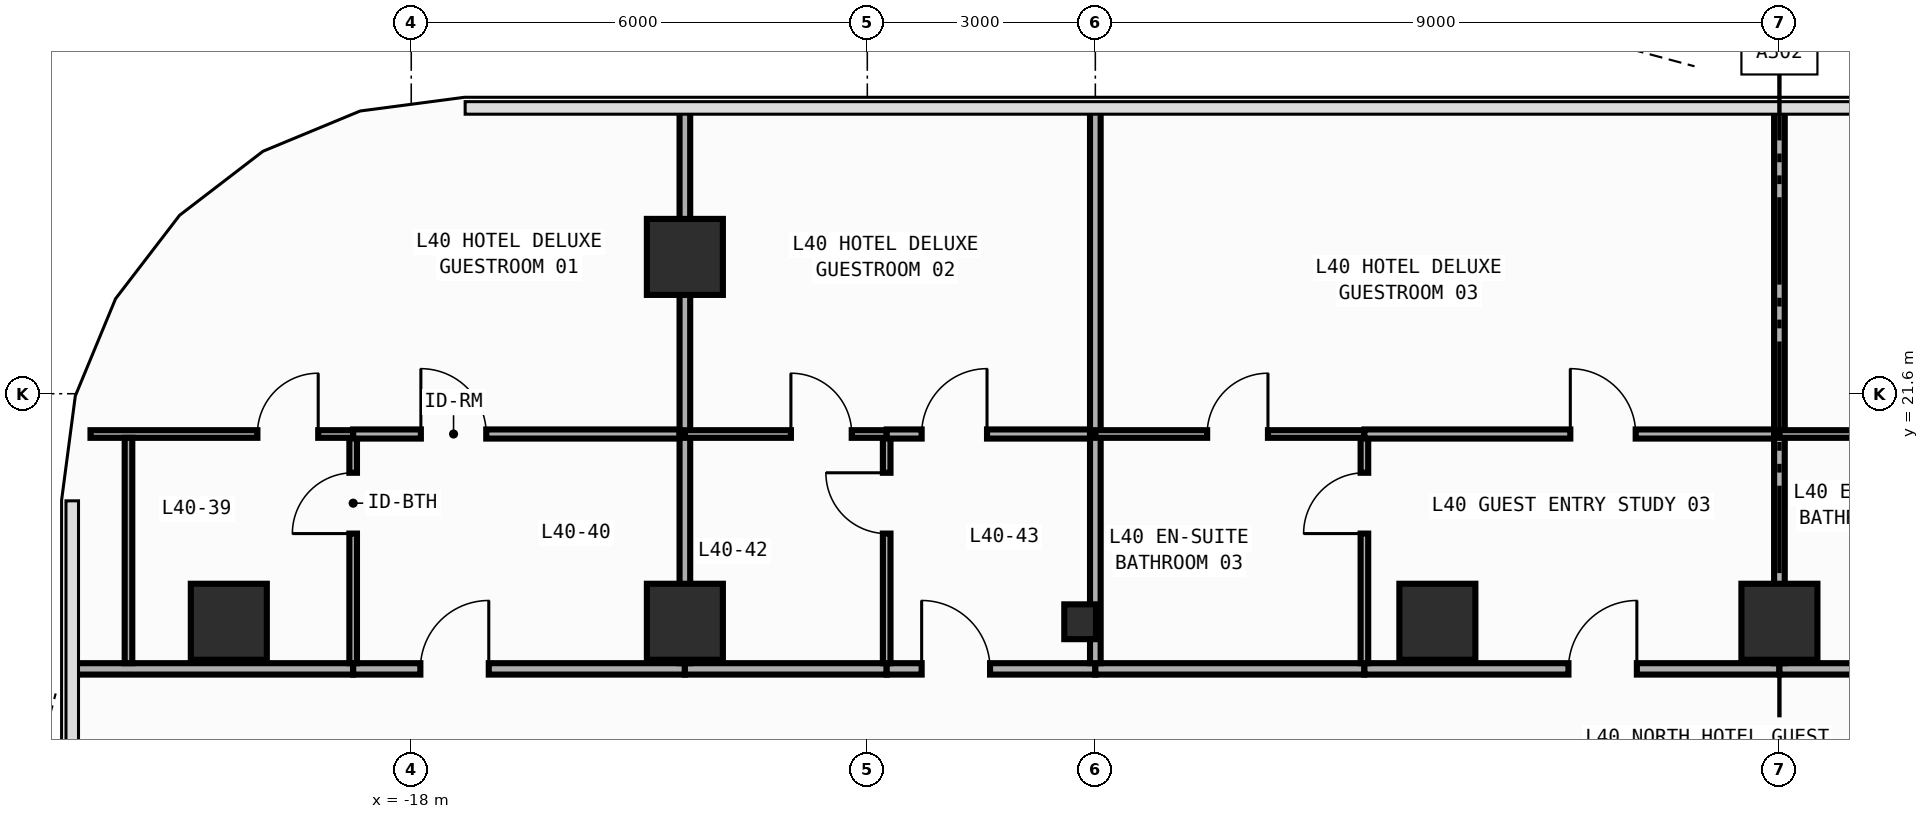
"""IFC4 building model, lengths in metres.
Left out: names, types, materials, properties, quantities, classifications, styles, units other than length and angle.
Written with IfcOpenShell. Run it as: python <this file> out.ifc"""

import sys

from ifc_helpers import new_model, si_unit, direction, frame, frame_2d, origin, origin_2d, place, context, subcontext, project, spatial, rectangle, i_section, extrude, element, fill, save


model = new_model("IFC4")
c1 = context("Model", 3, precision=1e-05, world=origin(), true_north=direction((0.0, 1.0)))
c2 = subcontext(c1, "Body", "Model", "MODEL_VIEW")
j1 = project(units=[si_unit("LENGTHUNIT", "METRE"), si_unit("PLANEANGLEUNIT", "RADIAN")], contexts=[c1])
p1 = place(None, origin())
s1 = spatial("IfcSite", under=j1, at=p1, CompositionType="ELEMENT")
p2 = place(p1, origin())
s2 = spatial("IfcBuilding", under=s1, at=p2, CompositionType="ELEMENT")
p3 = place(p2, frame((0.0, 0.0, 176.4)))
s3 = spatial("IfcBuildingStorey", under=s2, at=p3, CompositionType="ELEMENT", Elevation=176.4)
p4 = place(p3, frame((-9.2, 18.6, 0.0), z_axis=(0.0, 0.0, 1.0), x_axis=(1.0, 0.0, 0.0)))
e1 = element("IfcColumn", 1, at=p4, inside=s3, PredefinedType="COLUMN", context=c2, shape_type="SweptSolid", body=[
    extrude(i_section(OverallWidth=0.417, OverallDepth=0.458, WebThickness=0.03, FlangeThickness=0.05, FilletRadius=0.022, at=origin_2d()), origin(), (0.0, 0.0, 1.0), 3.8),
])
for number, where, z_axis, x_axis in (
    (2, (-20.4, 18.6, 0.0), (0.0, 0.0, 1.0), (1.0, 0.0, 0.0)),
    (3, (-14.4, 18.6, 0.0), (0.0, 0.0, 1.0), (1.0, 0.0, 0.0)),
    (4, (-4.5, 18.6, 0.0), (0.0, 0.0, 1.0), (1.0, 0.0, 0.0)),
    (5, (0.0, 18.6, 0.0), (0.0, 0.0, 1.0), (1.0, 0.0, 0.0)),
    (6, (-14.4, 23.4, 0.0), (0.0, 0.0, 1.0), (1.0, 0.0, 0.0)),
):
    element("IfcColumn", number, at=place(p3, frame(where, z_axis=z_axis, x_axis=x_axis)), inside=s3, PredefinedType="COLUMN", context=c2, shape_type="SweptSolid", body=[
        extrude(rectangle(XDim=1.0, YDim=1.0, at=origin_2d()), origin(), (0.0, 0.0, 1.0), 3.8),
    ])
p5 = place(p3, frame((-22.455, 17.98, 0.0), z_axis=(0.0, 0.0, 1.0), x_axis=(1.0, 0.0, 0.0)))
e7 = element("IfcWall", 7, at=p5, inside=s3, PredefinedType="PARTITIONING", context=c2, shape_type="SweptSolid", body=[
    extrude(rectangle(XDim=3.691, YDim=0.15, at=frame_2d((1.846, 0.0))), origin(), (0.0, 0.0, 1.0), 3.54),
])
p6 = place(p3, frame((-18.764, 17.98, 0.0), z_axis=(0.0, 0.0, 1.0), x_axis=(1.0, 0.0, 0.0)))
e8 = element("IfcWall", 8, at=p6, inside=s3, PredefinedType="PARTITIONING", context=c2, shape_type="SweptSolid", body=[
    extrude(rectangle(XDim=4.364, YDim=0.15, at=frame_2d((2.182, 0.0))), origin(), (0.0, 0.0, 1.0), 3.54),
])
p7 = place(p6, frame((0.884, 0.0, 0.0)))
e9 = element("IfcOpeningElement", 9, at=p7, cuts=e8, PredefinedType="OPENING", context=c2, shape_type="SweptSolid", body=[
    extrude(rectangle(XDim=0.9, YDim=2.15, at=frame_2d((0.45, 1.075))), frame((0.0, 0.085, 0.0), z_axis=(0.0, -1.0, 0.0), x_axis=(1.0, 0.0, 0.0)), (0.0, 0.0, 1.0), 0.17),
])
p8 = place(p3, frame((-14.4, 17.98, 0.0), z_axis=(0.0, 0.0, 1.0), x_axis=(1.0, 0.0, 0.0)))
e10 = element("IfcWall", 10, at=p8, inside=s3, PredefinedType="PARTITIONING", context=c2, shape_type="SweptSolid", body=[
    extrude(rectangle(XDim=2.655, YDim=0.15, at=frame_2d((1.327, 0.0))), origin(), (0.0, 0.0, 1.0), 3.54),
])
p9 = place(p3, frame((-11.745, 17.98, 0.0), z_axis=(0.0, 0.0, 1.0), x_axis=(1.0, 0.0, 0.0)))
e11 = element("IfcWall", 11, at=p9, inside=s3, PredefinedType="PARTITIONING", context=c2, shape_type="SweptSolid", body=[
    extrude(rectangle(XDim=2.745, YDim=0.15, at=frame_2d((1.373, 0.0))), origin(), (0.0, 0.0, 1.0), 3.54),
])
p10 = place(p9, frame((0.46, 0.0, 0.0)))
e12 = element("IfcOpeningElement", 12, at=p10, cuts=e11, PredefinedType="OPENING", context=c2, shape_type="SweptSolid", body=[
    extrude(rectangle(XDim=0.9, YDim=2.15, at=frame_2d((0.45, 1.075))), frame((0.0, 0.085, 0.0), z_axis=(0.0, -1.0, 0.0), x_axis=(1.0, 0.0, 0.0)), (0.0, 0.0, 1.0), 0.17),
])
p11 = place(p3, frame((-9.0, 17.98, 0.0), z_axis=(0.0, 0.0, 1.0), x_axis=(1.0, 0.0, 0.0)))
e13 = element("IfcWall", 13, at=p11, inside=s3, PredefinedType="PARTITIONING", context=c2, shape_type="SweptSolid", body=[
    extrude(rectangle(XDim=3.54, YDim=0.15, at=frame_2d((1.77, 0.0))), origin(), (0.0, 0.0, 1.0), 3.54),
])
p12 = place(p3, frame((-5.46, 17.98, 0.0), z_axis=(0.0, 0.0, 1.0), x_axis=(1.0, 0.0, 0.0)))
e14 = element("IfcWall", 14, at=p12, inside=s3, PredefinedType="PARTITIONING", context=c2, shape_type="SweptSolid", body=[
    extrude(rectangle(XDim=5.46, YDim=0.15, at=frame_2d((2.73, 0.0))), origin(), (0.0, 0.0, 1.0), 3.54),
])
p13 = place(p12, frame((2.684, 0.0, 0.0)))
e15 = element("IfcOpeningElement", 15, at=p13, cuts=e14, PredefinedType="OPENING", context=c2, shape_type="SweptSolid", body=[
    extrude(rectangle(XDim=0.9, YDim=2.15, at=frame_2d((0.45, 1.075))), frame((0.0, 0.085, 0.0), z_axis=(0.0, -1.0, 0.0), x_axis=(1.0, 0.0, 0.0)), (0.0, 0.0, 1.0), 0.17),
])
p14 = place(p3, frame((0.0, 17.98, 0.0), z_axis=(0.0, 0.0, 1.0), x_axis=(1.0, 0.0, 0.0)))
e16 = element("IfcWall", 16, at=p14, inside=s3, PredefinedType="PARTITIONING", context=c2, shape_type="SweptSolid", body=[
    extrude(rectangle(XDim=3.54, YDim=0.15, at=frame_2d((1.77, 0.0))), origin(), (0.0, 0.0, 1.0), 3.54),
])
p15 = place(p3, frame((-18.764, 18.055, 0.0), z_axis=(0.0, 0.0, 1.0), x_axis=(0.0, 1.0, 0.0)))
e17 = element("IfcWall", 17, at=p15, inside=s3, PredefinedType="PARTITIONING", context=c2, shape_type="SweptSolid", body=[
    extrude(rectangle(XDim=2.965, YDim=0.1, at=frame_2d((1.482, 0.0))), origin(), (0.0, 0.0, 1.0), 3.54),
])
p16 = place(p15, frame((1.705, 0.0, 0.0)))
e18 = element("IfcOpeningElement", 18, at=p16, cuts=e17, PredefinedType="OPENING", context=c2, shape_type="SweptSolid", body=[
    extrude(rectangle(XDim=0.8, YDim=2.1, at=frame_2d((0.4, 1.05))), frame((0.0, 0.06, 0.0), z_axis=(0.0, -1.0, 0.0), x_axis=(1.0, 0.0, 0.0)), (0.0, 0.0, 1.0), 0.12),
])
p17 = place(p3, frame((-22.22, 21.07, 0.0), z_axis=(0.0, 0.0, 1.0), x_axis=(1.0, 0.0, 0.0)))
e19 = element("IfcWall", 19, at=p17, inside=s3, PredefinedType="PARTITIONING", context=c2, shape_type="SweptSolid", body=[
    extrude(rectangle(XDim=3.456, YDim=0.1, at=frame_2d((1.728, 0.0))), origin(), (0.0, 0.0, 1.0), 3.54),
])
p18 = place(p17, frame((2.196, 0.0, 0.0)))
e20 = element("IfcOpeningElement", 20, at=p18, cuts=e19, PredefinedType="OPENING", context=c2, shape_type="SweptSolid", body=[
    extrude(rectangle(XDim=0.8, YDim=2.1, at=frame_2d((0.4, 1.05))), frame((0.0, 0.06, 0.0), z_axis=(0.0, -1.0, 0.0), x_axis=(1.0, 0.0, 0.0)), (0.0, 0.0, 1.0), 0.12),
])
p19 = place(p3, frame((-18.764, 21.07, 0.0), z_axis=(0.0, 0.0, 1.0), x_axis=(1.0, 0.0, 0.0)))
e21 = element("IfcWall", 21, at=p19, inside=s3, PredefinedType="PARTITIONING", context=c2, shape_type="SweptSolid", body=[
    extrude(rectangle(XDim=4.364, YDim=0.12, at=frame_2d((2.182, 0.0))), origin(), (0.0, 0.0, 1.0), 3.54),
])
p20 = place(p19, frame((0.891, 0.0, 0.0)))
e22 = element("IfcOpeningElement", 22, at=p20, cuts=e21, PredefinedType="OPENING", context=c2, shape_type="SweptSolid", body=[
    extrude(rectangle(XDim=0.86, YDim=2.15, at=frame_2d((0.43, 1.075))), frame((0.0, 0.07, 0.0), z_axis=(0.0, -1.0, 0.0), x_axis=(1.0, 0.0, 0.0)), (0.0, 0.0, 1.0), 0.14),
])
p21 = place(p3, frame((-14.4, 18.055, 0.0), z_axis=(0.0, 0.0, 1.0), x_axis=(0.0, 1.0, 0.0)))
e23 = element("IfcWall", 23, at=p21, inside=s3, PredefinedType="PARTITIONING", context=c2, shape_type="SweptSolid", body=[
    extrude(rectangle(XDim=3.015, YDim=0.14, at=frame_2d((1.508, 0.0))), origin(), (0.0, 0.0, 1.0), 2.952),
])
p22 = place(p3, frame((-14.4, 21.07, 0.0), z_axis=(0.0, 0.0, 1.0), x_axis=(0.0, 1.0, 0.0)))
e24 = element("IfcWall", 24, at=p22, inside=s3, PredefinedType="PARTITIONING", context=c2, shape_type="SweptSolid", body=[
    extrude(rectangle(XDim=4.285, YDim=0.14, at=frame_2d((2.143, 0.0))), origin(), (0.0, 0.0, 1.0), 2.952),
])
p23 = place(p3, frame((-11.745, 18.055, 0.0), z_axis=(0.0, 0.0, 1.0), x_axis=(0.0, 1.0, 0.0)))
e25 = element("IfcWall", 25, at=p23, inside=s3, PredefinedType="PARTITIONING", context=c2, shape_type="SweptSolid", body=[
    extrude(rectangle(XDim=2.965, YDim=0.1, at=frame_2d((1.482, 0.0))), origin(), (0.0, 0.0, 1.0), 3.54),
])
p24 = place(p23, frame((1.705, 0.0, 0.0)))
e26 = element("IfcOpeningElement", 26, at=p24, cuts=e25, PredefinedType="OPENING", context=c2, shape_type="SweptSolid", body=[
    extrude(rectangle(XDim=0.8, YDim=2.1, at=frame_2d((0.4, 1.05))), frame((0.0, 0.06, 0.0), z_axis=(0.0, -1.0, 0.0), x_axis=(1.0, 0.0, 0.0)), (0.0, 0.0, 1.0), 0.12),
])
p25 = place(p3, frame((-14.4, 21.07, 0.0), z_axis=(0.0, 0.0, 1.0), x_axis=(1.0, 0.0, 0.0)))
e27 = element("IfcWall", 27, at=p25, inside=s3, PredefinedType="PARTITIONING", context=c2, shape_type="SweptSolid", body=[
    extrude(rectangle(XDim=2.655, YDim=0.1, at=frame_2d((1.327, 0.0))), origin(), (0.0, 0.0, 1.0), 3.54),
])
p26 = place(p25, frame((1.395, 0.0, 0.0)))
e28 = element("IfcOpeningElement", 28, at=p26, cuts=e27, PredefinedType="OPENING", context=c2, shape_type="SweptSolid", body=[
    extrude(rectangle(XDim=0.8, YDim=2.1, at=frame_2d((0.4, 1.05))), frame((0.0, 0.06, 0.0), z_axis=(0.0, -1.0, 0.0), x_axis=(1.0, 0.0, 0.0)), (0.0, 0.0, 1.0), 0.12),
])
p27 = place(p3, frame((-11.745, 21.07, 0.0), z_axis=(0.0, 0.0, 1.0), x_axis=(1.0, 0.0, 0.0)))
e29 = element("IfcWall", 29, at=p27, inside=s3, PredefinedType="PARTITIONING", context=c2, shape_type="SweptSolid", body=[
    extrude(rectangle(XDim=2.745, YDim=0.12, at=frame_2d((1.373, 0.0))), origin(), (0.0, 0.0, 1.0), 3.54),
])
p28 = place(p27, frame((0.46, 0.0, 0.0)))
e30 = element("IfcOpeningElement", 30, at=p28, cuts=e29, PredefinedType="OPENING", context=c2, shape_type="SweptSolid", body=[
    extrude(rectangle(XDim=0.86, YDim=2.15, at=frame_2d((0.43, 1.075))), frame((0.0, 0.07, 0.0), z_axis=(0.0, -1.0, 0.0), x_axis=(1.0, 0.0, 0.0)), (0.0, 0.0, 1.0), 0.14),
])
p29 = place(p3, frame((-9.0, 18.055, 0.0), z_axis=(0.0, 0.0, 1.0), x_axis=(0.0, 1.0, 0.0)))
e31 = element("IfcWall", 31, at=p29, inside=s3, PredefinedType="PARTITIONING", context=c2, shape_type="SweptSolid", body=[
    extrude(rectangle(XDim=3.015, YDim=0.14, at=frame_2d((1.508, 0.0))), origin(), (0.0, 0.0, 1.0), 2.952),
])
p30 = place(p3, frame((-9.0, 21.07, 0.0), z_axis=(0.0, 0.0, 1.0), x_axis=(0.0, 1.0, 0.0)))
e32 = element("IfcWall", 32, at=p30, inside=s3, PredefinedType="PARTITIONING", context=c2, shape_type="SweptSolid", body=[
    extrude(rectangle(XDim=4.285, YDim=0.14, at=frame_2d((2.143, 0.0))), origin(), (0.0, 0.0, 1.0), 3.54),
])
p31 = place(p3, frame((-5.46, 18.055, 0.0), z_axis=(0.0, 0.0, 1.0), x_axis=(0.0, 1.0, 0.0)))
e33 = element("IfcWall", 33, at=p31, inside=s3, PredefinedType="PARTITIONING", context=c2, shape_type="SweptSolid", body=[
    extrude(rectangle(XDim=2.965, YDim=0.1, at=frame_2d((1.482, 0.0))), origin(), (0.0, 0.0, 1.0), 3.54),
])
p32 = place(p31, frame((1.705, 0.0, 0.0)))
e34 = element("IfcOpeningElement", 34, at=p32, cuts=e33, PredefinedType="OPENING", context=c2, shape_type="SweptSolid", body=[
    extrude(rectangle(XDim=0.8, YDim=2.1, at=frame_2d((0.4, 1.05))), frame((0.0, 0.06, 0.0), z_axis=(0.0, -1.0, 0.0), x_axis=(1.0, 0.0, 0.0)), (0.0, 0.0, 1.0), 0.12),
])
p33 = place(p3, frame((-9.0, 21.07, 0.0), z_axis=(0.0, 0.0, 1.0), x_axis=(1.0, 0.0, 0.0)))
e35 = element("IfcWall", 35, at=p33, inside=s3, PredefinedType="PARTITIONING", context=c2, shape_type="SweptSolid", body=[
    extrude(rectangle(XDim=3.54, YDim=0.1, at=frame_2d((1.77, 0.0))), origin(), (0.0, 0.0, 1.0), 3.54),
])
p34 = place(p33, frame((1.471, 0.0, 0.0)))
e36 = element("IfcOpeningElement", 36, at=p34, cuts=e35, PredefinedType="OPENING", context=c2, shape_type="SweptSolid", body=[
    extrude(rectangle(XDim=0.8, YDim=2.1, at=frame_2d((0.4, 1.05))), frame((0.0, 0.06, 0.0), z_axis=(0.0, -1.0, 0.0), x_axis=(1.0, 0.0, 0.0)), (0.0, 0.0, 1.0), 0.12),
])
p35 = place(p3, frame((-5.46, 21.07, 0.0), z_axis=(0.0, 0.0, 1.0), x_axis=(1.0, 0.0, 0.0)))
e37 = element("IfcWall", 37, at=p35, inside=s3, PredefinedType="PARTITIONING", context=c2, shape_type="SweptSolid", body=[
    extrude(rectangle(XDim=5.46, YDim=0.12, at=frame_2d((2.73, 0.0))), origin(), (0.0, 0.0, 1.0), 3.54),
])
p36 = place(p35, frame((2.709, 0.0, 0.0)))
e38 = element("IfcOpeningElement", 38, at=p36, cuts=e37, PredefinedType="OPENING", context=c2, shape_type="SweptSolid", body=[
    extrude(rectangle(XDim=0.86, YDim=2.15, at=frame_2d((0.43, 1.075))), frame((0.0, 0.07, 0.0), z_axis=(0.0, -1.0, 0.0), x_axis=(1.0, 0.0, 0.0)), (0.0, 0.0, 1.0), 0.14),
])
p37 = place(p3, frame((0.0, 18.055, 0.0), z_axis=(0.0, 0.0, 1.0), x_axis=(0.0, 1.0, 0.0)))
e39 = element("IfcWall", 39, at=p37, inside=s3, PredefinedType="PARTITIONING", context=c2, shape_type="SweptSolid", body=[
    extrude(rectangle(XDim=3.015, YDim=0.14, at=frame_2d((1.508, 0.0))), origin(), (0.0, 0.0, 1.0), 3.54),
])
p38 = place(p3, frame((0.0, 21.07, 0.0), z_axis=(0.0, 0.0, 1.0), x_axis=(0.0, 1.0, 0.0)))
e40 = element("IfcWall", 40, at=p38, inside=s3, PredefinedType="PARTITIONING", context=c2, shape_type="SweptSolid", body=[
    extrude(rectangle(XDim=4.285, YDim=0.14, at=frame_2d((2.143, 0.0))), origin(), (0.0, 0.0, 1.0), 3.54),
])
p39 = place(p3, frame((0.0, 21.07, 0.0), z_axis=(0.0, 0.0, 1.0), x_axis=(1.0, 0.0, 0.0)))
e41 = element("IfcWall", 41, at=p39, inside=s3, PredefinedType="PARTITIONING", context=c2, shape_type="SweptSolid", body=[
    extrude(rectangle(XDim=3.54, YDim=0.1, at=frame_2d((1.77, 0.0))), origin(), (0.0, 0.0, 1.0), 3.54),
])
p40 = place(p39, frame((1.875, 0.0, 0.0)))
e42 = element("IfcOpeningElement", 42, at=p40, cuts=e41, PredefinedType="OPENING", context=c2, shape_type="SweptSolid", body=[
    extrude(rectangle(XDim=0.8, YDim=2.1, at=frame_2d((0.4, 1.05))), frame((0.0, 0.06, 0.0), z_axis=(0.0, -1.0, 0.0), x_axis=(1.0, 0.0, 0.0)), (0.0, 0.0, 1.0), 0.12),
])
p41 = place(p3, frame((-21.72, 18.055, 0.0), z_axis=(0.0, 0.0, 1.0), x_axis=(0.0, 1.0, 0.0)))
e43 = element("IfcWall", 43, at=p41, inside=s3, PredefinedType="PARTITIONING", context=c2, shape_type="SweptSolid", body=[
    extrude(rectangle(XDim=2.965, YDim=0.1, at=frame_2d((1.482, 0.0))), origin(), (0.0, 0.0, 1.0), 3.54),
])
p42 = place(p7, origin())
e44 = element("IfcDoor", 44, at=p42, inside=s3, OperationType="SINGLE_SWING_RIGHT", PredefinedType="DOOR", context=c2, shape_type="SweptSolid", body=[
    extrude(rectangle(XDim=0.9, YDim=2.15, at=frame_2d((0.45, 1.075))), frame((0.0, 0.025, 0.0), z_axis=(0.0, -1.0, 0.0), x_axis=(1.0, 0.0, 0.0)), (0.0, 0.0, 1.0), 0.05),
])
fill(e9, e44)
p43 = place(p10, origin())
e45 = element("IfcDoor", 45, at=p43, inside=s3, OperationType="SINGLE_SWING_LEFT", PredefinedType="DOOR", context=c2, shape_type="SweptSolid", body=[
    extrude(rectangle(XDim=0.9, YDim=2.15, at=frame_2d((0.45, 1.075))), frame((0.0, 0.025, 0.0), z_axis=(0.0, -1.0, 0.0), x_axis=(1.0, 0.0, 0.0)), (0.0, 0.0, 1.0), 0.05),
])
fill(e12, e45)
p44 = place(p13, origin())
e46 = element("IfcDoor", 46, at=p44, inside=s3, OperationType="SINGLE_SWING_RIGHT", PredefinedType="DOOR", context=c2, shape_type="SweptSolid", body=[
    extrude(rectangle(XDim=0.9, YDim=2.15, at=frame_2d((0.45, 1.075))), frame((0.0, 0.025, 0.0), z_axis=(0.0, -1.0, 0.0), x_axis=(1.0, 0.0, 0.0)), (0.0, 0.0, 1.0), 0.05),
])
fill(e15, e46)
p45 = place(p16, origin())
e47 = element("IfcDoor", 47, at=p45, inside=s3, OperationType="SINGLE_SWING_LEFT", PredefinedType="DOOR", context=c2, shape_type="SweptSolid", body=[
    extrude(rectangle(XDim=0.8, YDim=2.1, at=frame_2d((0.4, 1.05))), frame((0.0, 0.025, 0.0), z_axis=(0.0, -1.0, 0.0), x_axis=(1.0, 0.0, 0.0)), (0.0, 0.0, 1.0), 0.05),
])
fill(e18, e47)
p46 = place(p18, origin())
e48 = element("IfcDoor", 48, at=p46, inside=s3, OperationType="SINGLE_SWING_RIGHT", PredefinedType="DOOR", context=c2, shape_type="SweptSolid", body=[
    extrude(rectangle(XDim=0.8, YDim=2.1, at=frame_2d((0.4, 1.05))), frame((0.0, 0.025, 0.0), z_axis=(0.0, -1.0, 0.0), x_axis=(1.0, 0.0, 0.0)), (0.0, 0.0, 1.0), 0.05),
])
fill(e20, e48)
p47 = place(p20, origin())
e49 = element("IfcDoor", 49, at=p47, inside=s3, OperationType="SINGLE_SWING_LEFT", PredefinedType="DOOR", context=c2, shape_type="SweptSolid", body=[
    extrude(rectangle(XDim=0.86, YDim=2.15, at=frame_2d((0.43, 1.075))), frame((0.0, 0.025, 0.0), z_axis=(0.0, -1.0, 0.0), x_axis=(1.0, 0.0, 0.0)), (0.0, 0.0, 1.0), 0.05),
])
fill(e22, e49)
p48 = place(p24, origin())
e50 = element("IfcDoor", 50, at=p48, inside=s3, OperationType="SINGLE_SWING_RIGHT", PredefinedType="DOOR", context=c2, shape_type="SweptSolid", body=[
    extrude(rectangle(XDim=0.8, YDim=2.1, at=frame_2d((0.4, 1.05))), frame((0.0, 0.025, 0.0), z_axis=(0.0, -1.0, 0.0), x_axis=(1.0, 0.0, 0.0)), (0.0, 0.0, 1.0), 0.05),
])
fill(e26, e50)
p49 = place(p26, origin())
e51 = element("IfcDoor", 51, at=p49, inside=s3, OperationType="SINGLE_SWING_LEFT", PredefinedType="DOOR", context=c2, shape_type="SweptSolid", body=[
    extrude(rectangle(XDim=0.8, YDim=2.1, at=frame_2d((0.4, 1.05))), frame((0.0, 0.025, 0.0), z_axis=(0.0, -1.0, 0.0), x_axis=(1.0, 0.0, 0.0)), (0.0, 0.0, 1.0), 0.05),
])
fill(e28, e51)
p50 = place(p28, origin())
e52 = element("IfcDoor", 52, at=p50, inside=s3, OperationType="SINGLE_SWING_RIGHT", PredefinedType="DOOR", context=c2, shape_type="SweptSolid", body=[
    extrude(rectangle(XDim=0.86, YDim=2.15, at=frame_2d((0.43, 1.075))), frame((0.0, 0.025, 0.0), z_axis=(0.0, -1.0, 0.0), x_axis=(1.0, 0.0, 0.0)), (0.0, 0.0, 1.0), 0.05),
])
fill(e30, e52)
p51 = place(p32, origin())
e53 = element("IfcDoor", 53, at=p51, inside=s3, OperationType="SINGLE_SWING_LEFT", PredefinedType="DOOR", context=c2, shape_type="SweptSolid", body=[
    extrude(rectangle(XDim=0.8, YDim=2.1, at=frame_2d((0.4, 1.05))), frame((0.0, 0.025, 0.0), z_axis=(0.0, -1.0, 0.0), x_axis=(1.0, 0.0, 0.0)), (0.0, 0.0, 1.0), 0.05),
])
fill(e34, e53)
p52 = place(p34, origin())
e54 = element("IfcDoor", 54, at=p52, inside=s3, OperationType="SINGLE_SWING_RIGHT", PredefinedType="DOOR", context=c2, shape_type="SweptSolid", body=[
    extrude(rectangle(XDim=0.8, YDim=2.1, at=frame_2d((0.4, 1.05))), frame((0.0, 0.025, 0.0), z_axis=(0.0, -1.0, 0.0), x_axis=(1.0, 0.0, 0.0)), (0.0, 0.0, 1.0), 0.05),
])
fill(e36, e54)
p53 = place(p36, origin())
e55 = element("IfcDoor", 55, at=p53, inside=s3, OperationType="SINGLE_SWING_LEFT", PredefinedType="DOOR", context=c2, shape_type="SweptSolid", body=[
    extrude(rectangle(XDim=0.86, YDim=2.15, at=frame_2d((0.43, 1.075))), frame((0.0, 0.025, 0.0), z_axis=(0.0, -1.0, 0.0), x_axis=(1.0, 0.0, 0.0)), (0.0, 0.0, 1.0), 0.05),
])
fill(e38, e55)
save(model, sys.argv[1])
